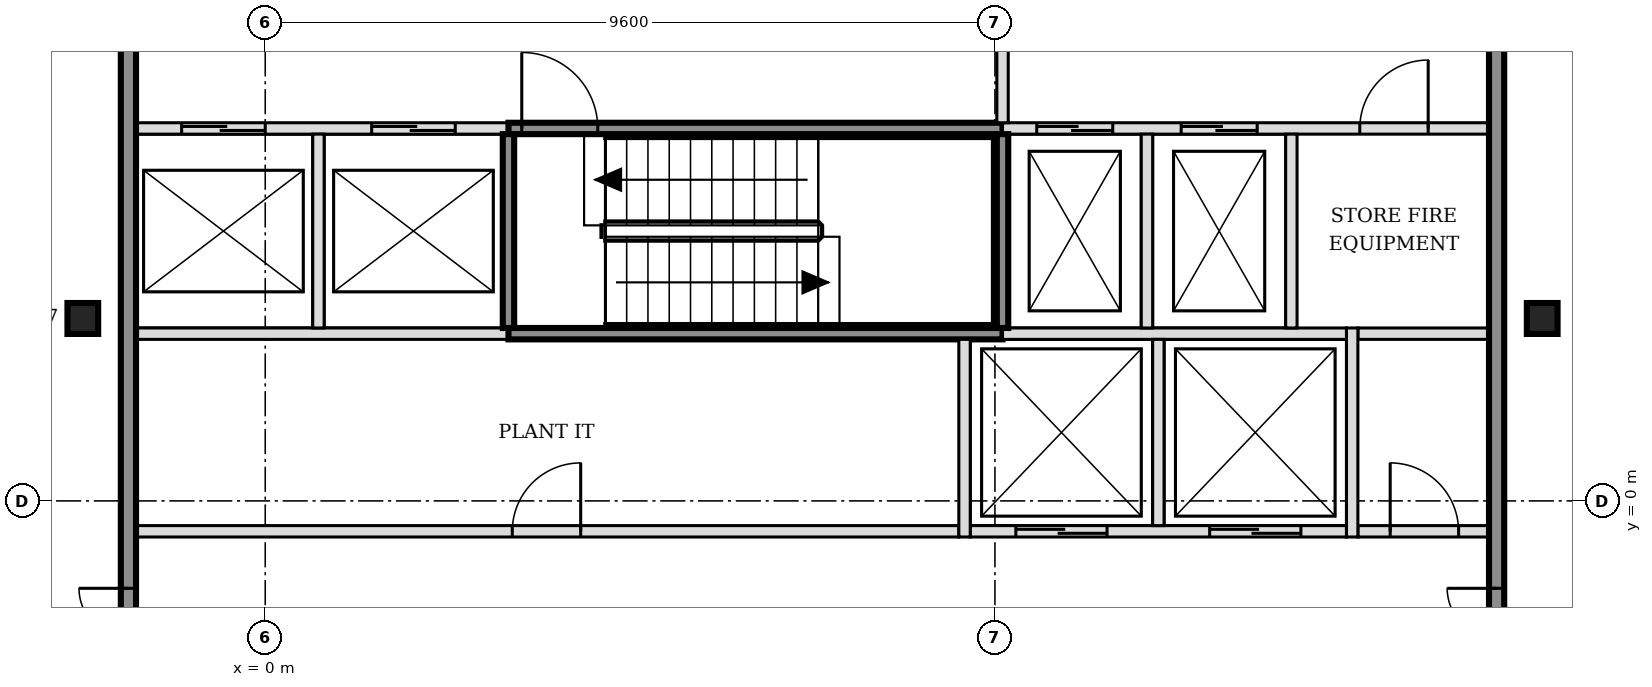
"""IFC4 building model, lengths in metres.
Left out: names, types, materials, properties, quantities, classifications, styles, units other than length and angle.
Written with IfcOpenShell. Run it as: python <this file> out.ifc"""

import sys

from ifc_helpers import new_model, si_unit, direction, frame, frame_2d, origin, origin_2d, place, context, subcontext, project, spatial, rectangle, i_section, extrude, element, fill, save


model = new_model("IFC4")
c1 = context("Model", 3, precision=1e-05, world=origin(), true_north=direction((0.0, 1.0)))
c2 = subcontext(c1, "Body", "Model", "MODEL_VIEW")
j1 = project(units=[si_unit("LENGTHUNIT", "METRE"), si_unit("PLANEANGLEUNIT", "RADIAN")], contexts=[c1])
p1 = place(None, origin())
s1 = spatial("IfcSite", under=j1, at=p1, CompositionType="ELEMENT")
p2 = place(p1, origin())
s2 = spatial("IfcBuilding", under=s1, at=p2, CompositionType="ELEMENT")
p3 = place(p2, frame((0.0, 0.0, 232.2)))
s3 = spatial("IfcBuildingStorey", under=s2, at=p3, CompositionType="ELEMENT", Elevation=232.2)
for number, where, z_axis, x_axis in (
    (1, (-2.4, 2.4, -0.15), (0.0, 0.0, 1.0), (1.0, 0.0, 0.0)),
    (2, (16.8, 2.4, -0.15), (0.0, 0.0, 1.0), (1.0, 0.0, 0.0)),
):
    element("IfcColumn", number, at=place(p3, frame(where, z_axis=z_axis, x_axis=x_axis)), inside=s3, PredefinedType="COLUMN", context=c2, shape_type="SweptSolid", body=[
        extrude(i_section(OverallWidth=0.404, OverallDepth=0.407, WebThickness=0.027, FlangeThickness=0.044, FilletRadius=0.015, at=origin_2d()), origin(), (0.0, 0.0, 1.0), 3.6),
    ])
p4 = place(p3, frame((-1.7, -0.4, 0.0), z_axis=(0.0, 0.0, 1.0), x_axis=(1.0, 0.0, 0.0)))
e3 = element("IfcWall", 3, at=p4, inside=s3, PredefinedType="PARTITIONING", context=c2, shape_type="SweptSolid", body=[
    extrude(rectangle(XDim=10.825, YDim=0.15, at=frame_2d((5.413, 0.0))), origin(), (0.0, 0.0, 1.0), 3.45),
])
p5 = place(p4, frame((4.95, 0.0, 0.0)))
e4 = element("IfcOpeningElement", 4, at=p5, cuts=e3, PredefinedType="OPENING", context=c2, shape_type="SweptSolid", body=[
    extrude(rectangle(XDim=0.9, YDim=2.1, at=frame_2d((0.45, 1.05))), frame((0.0, 0.085, 0.0), z_axis=(0.0, -1.0, 0.0), x_axis=(1.0, 0.0, 0.0)), (0.0, 0.0, 1.0), 0.17),
])
p6 = place(p3, frame((9.275, -0.4, 0.0), z_axis=(0.0, 0.0, 1.0), x_axis=(1.0, 0.0, 0.0)))
e5 = element("IfcWall", 5, at=p6, inside=s3, PredefinedType="SOLIDWALL", context=c2, shape_type="SweptSolid", body=[
    extrude(rectangle(XDim=4.95, YDim=0.15, at=frame_2d((2.475, 0.0))), origin(), (0.0, 0.0, 1.0), 3.45),
])
p7 = place(p6, frame((0.6, 0.0, 0.0)))
e6 = element("IfcOpeningElement", 6, at=p7, cuts=e5, PredefinedType="OPENING", context=c2, shape_type="SweptSolid", body=[
    extrude(rectangle(XDim=1.2, YDim=2.1, at=frame_2d((0.6, 1.05))), frame((0.0, 0.085, 0.0), z_axis=(0.0, -1.0, 0.0), x_axis=(1.0, 0.0, 0.0)), (0.0, 0.0, 1.0), 0.17),
])
p8 = place(p6, frame((3.15, 0.0, 0.0)))
e7 = element("IfcOpeningElement", 7, at=p8, cuts=e5, PredefinedType="OPENING", context=c2, shape_type="SweptSolid", body=[
    extrude(rectangle(XDim=1.2, YDim=2.1, at=frame_2d((0.6, 1.05))), frame((0.0, 0.085, 0.0), z_axis=(0.0, -1.0, 0.0), x_axis=(1.0, 0.0, 0.0)), (0.0, 0.0, 1.0), 0.17),
])
p9 = place(p3, frame((14.375, -0.4, 0.0), z_axis=(0.0, 0.0, 1.0), x_axis=(1.0, 0.0, 0.0)))
e8 = element("IfcWall", 8, at=p9, inside=s3, PredefinedType="PARTITIONING", context=c2, shape_type="SweptSolid", body=[
    extrude(rectangle(XDim=1.725, YDim=0.15, at=frame_2d((0.863, 0.0))), origin(), (0.0, 0.0, 1.0), 3.45),
])
p10 = place(p9, frame((0.425, 0.0, 0.0)))
e9 = element("IfcOpeningElement", 9, at=p10, cuts=e8, PredefinedType="OPENING", context=c2, shape_type="SweptSolid", body=[
    extrude(rectangle(XDim=0.9, YDim=2.1, at=frame_2d((0.45, 1.05))), frame((0.0, 0.085, 0.0), z_axis=(0.0, -1.0, 0.0), x_axis=(1.0, 0.0, 0.0)), (0.0, 0.0, 1.0), 0.17),
])
p11 = place(p3, frame((-1.7, 2.2, 0.0), z_axis=(0.0, 0.0, 1.0), x_axis=(1.0, 0.0, 0.0)))
e10 = element("IfcWall", 10, at=p11, inside=s3, PredefinedType="SOLIDWALL", context=c2, shape_type="SweptSolid", body=[
    extrude(rectangle(XDim=4.9, YDim=0.15, at=frame_2d((2.45, 0.0))), origin(), (0.0, 0.0, 1.0), 3.45),
])
p12 = place(p3, frame((3.2, 2.2, 0.0), z_axis=(0.0, 0.0, 1.0), x_axis=(1.0, 0.0, 0.0)))
e11 = element("IfcWall", 11, at=p12, inside=s3, PredefinedType="SOLIDWALL", context=c2, shape_type="SweptSolid", body=[
    extrude(rectangle(XDim=6.5, YDim=0.15, at=frame_2d((3.25, 0.0))), origin(), (0.0, 0.0, 1.0), 3.45),
])
p13 = place(p3, frame((9.7, 2.2, 0.0), z_axis=(0.0, 0.0, 1.0), x_axis=(1.0, 0.0, 0.0)))
e12 = element("IfcWall", 12, at=p13, inside=s3, PredefinedType="SOLIDWALL", context=c2, shape_type="SweptSolid", body=[
    extrude(rectangle(XDim=4.525, YDim=0.15, at=frame_2d((2.263, 0.0))), origin(), (0.0, 0.0, 1.0), 3.45),
])
p14 = place(p3, frame((14.375, 2.2, 0.0), z_axis=(0.0, 0.0, 1.0), x_axis=(1.0, 0.0, 0.0)))
e13 = element("IfcWall", 13, at=p14, inside=s3, PredefinedType="PARTITIONING", context=c2, shape_type="SweptSolid", body=[
    extrude(rectangle(XDim=1.725, YDim=0.15, at=frame_2d((0.863, 0.0))), origin(), (0.0, 0.0, 1.0), 3.45),
])
p15 = place(p3, frame((-1.7, 4.9, 0.0), z_axis=(0.0, 0.0, 1.0), x_axis=(1.0, 0.0, 0.0)))
e14 = element("IfcWall", 14, at=p15, inside=s3, PredefinedType="SOLIDWALL", context=c2, shape_type="SweptSolid", body=[
    extrude(rectangle(XDim=4.9, YDim=0.15, at=frame_2d((2.45, 0.0))), origin(), (0.0, 0.0, 1.0), 3.45),
])
p16 = place(p15, frame((0.6, 0.0, 0.0)))
e15 = element("IfcOpeningElement", 15, at=p16, cuts=e14, PredefinedType="OPENING", context=c2, shape_type="SweptSolid", body=[
    extrude(rectangle(XDim=1.1, YDim=2.1, at=frame_2d((0.55, 1.05))), frame((0.0, 0.085, 0.0), z_axis=(0.0, -1.0, 0.0), x_axis=(1.0, 0.0, 0.0)), (0.0, 0.0, 1.0), 0.17),
])
p17 = place(p15, frame((3.1, 0.0, 0.0)))
e16 = element("IfcOpeningElement", 16, at=p17, cuts=e14, PredefinedType="OPENING", context=c2, shape_type="SweptSolid", body=[
    extrude(rectangle(XDim=1.1, YDim=2.1, at=frame_2d((0.55, 1.05))), frame((0.0, 0.085, 0.0), z_axis=(0.0, -1.0, 0.0), x_axis=(1.0, 0.0, 0.0)), (0.0, 0.0, 1.0), 0.17),
])
p18 = place(p3, frame((3.2, 4.9, 0.0), z_axis=(0.0, 0.0, 1.0), x_axis=(1.0, 0.0, 0.0)))
e17 = element("IfcWall", 17, at=p18, inside=s3, PredefinedType="SOLIDWALL", context=c2, shape_type="SweptSolid", body=[
    extrude(rectangle(XDim=6.5, YDim=0.15, at=frame_2d((3.25, 0.0))), origin(), (0.0, 0.0, 1.0), 3.45),
])
p19 = place(p18, frame((0.175, 0.0, 0.0)))
e18 = element("IfcOpeningElement", 18, at=p19, cuts=e17, PredefinedType="OPENING", context=c2, shape_type="SweptSolid", body=[
    extrude(rectangle(XDim=1.0, YDim=2.1, at=frame_2d((0.5, 1.05))), frame((0.0, 0.085, 0.0), z_axis=(0.0, -1.0, 0.0), x_axis=(1.0, 0.0, 0.0)), (0.0, 0.0, 1.0), 0.17),
])
p20 = place(p3, frame((9.7, 4.9, 0.0), z_axis=(0.0, 0.0, 1.0), x_axis=(1.0, 0.0, 0.0)))
e19 = element("IfcWall", 19, at=p20, inside=s3, PredefinedType="SOLIDWALL", context=c2, shape_type="SweptSolid", body=[
    extrude(rectangle(XDim=6.4, YDim=0.15, at=frame_2d((3.2, 0.0))), origin(), (0.0, 0.0, 1.0), 3.45),
])
p21 = place(p20, frame((0.45, 0.0, 0.0)))
e20 = element("IfcOpeningElement", 20, at=p21, cuts=e19, PredefinedType="OPENING", context=c2, shape_type="SweptSolid", body=[
    extrude(rectangle(XDim=1.0, YDim=2.1, at=frame_2d((0.5, 1.05))), frame((0.0, 0.085, 0.0), z_axis=(0.0, -1.0, 0.0), x_axis=(1.0, 0.0, 0.0)), (0.0, 0.0, 1.0), 0.17),
])
p22 = place(p20, frame((2.35, 0.0, 0.0)))
e21 = element("IfcOpeningElement", 21, at=p22, cuts=e19, PredefinedType="OPENING", context=c2, shape_type="SweptSolid", body=[
    extrude(rectangle(XDim=1.0, YDim=2.1, at=frame_2d((0.5, 1.05))), frame((0.0, 0.085, 0.0), z_axis=(0.0, -1.0, 0.0), x_axis=(1.0, 0.0, 0.0)), (0.0, 0.0, 1.0), 0.17),
])
p23 = place(p20, frame((4.7, 0.0, 0.0)))
e22 = element("IfcOpeningElement", 22, at=p23, cuts=e19, PredefinedType="OPENING", context=c2, shape_type="SweptSolid", body=[
    extrude(rectangle(XDim=0.9, YDim=2.1, at=frame_2d((0.45, 1.05))), frame((0.0, 0.085, 0.0), z_axis=(0.0, -1.0, 0.0), x_axis=(1.0, 0.0, 0.0)), (0.0, 0.0, 1.0), 0.17),
])
p24 = place(p3, frame((-1.8, -5.5, 0.0), z_axis=(0.0, 0.0, 1.0), x_axis=(0.0, 1.0, 0.0)))
e23 = element("IfcWall", 23, at=p24, inside=s3, PredefinedType="SOLIDWALL", context=c2, shape_type="SweptSolid", body=[
    extrude(rectangle(XDim=15.8, YDim=0.2, at=frame_2d((7.9, 0.0))), origin(), (0.0, 0.0, 1.0), 3.45),
])
p25 = place(p24, frame((3.05, 0.0, 0.0)))
e24 = element("IfcOpeningElement", 24, at=p25, cuts=e23, PredefinedType="OPENING", context=c2, shape_type="SweptSolid", body=[
    extrude(rectangle(XDim=1.3, YDim=2.1, at=frame_2d((0.65, 1.05))), frame((0.0, 0.11, 0.0), z_axis=(0.0, -1.0, 0.0), x_axis=(1.0, 0.0, 0.0)), (0.0, 0.0, 1.0), 0.22),
])
p26 = place(p24, frame((11.45, 0.0, 0.0)))
e25 = element("IfcOpeningElement", 25, at=p26, cuts=e23, PredefinedType="OPENING", context=c2, shape_type="SweptSolid", body=[
    extrude(rectangle(XDim=1.3, YDim=2.1, at=frame_2d((0.65, 1.05))), frame((0.0, 0.11, 0.0), z_axis=(0.0, -1.0, 0.0), x_axis=(1.0, 0.0, 0.0)), (0.0, 0.0, 1.0), 0.22),
])
for number, where, z_axis, x_axis in (
    (26, (0.7, 2.275, 0.0), (0.0, 0.0, 1.0), (0.0, 1.0, 0.0)),
    (27, (3.2, 2.275, 0.0), (0.0, 0.0, 1.0), (0.0, 1.0, 0.0)),
):
    element("IfcWall", number, at=place(p3, frame(where, z_axis=z_axis, x_axis=x_axis)), inside=s3, PredefinedType="SOLIDWALL", context=c2, shape_type="SweptSolid", body=[
        extrude(rectangle(XDim=2.55, YDim=0.15, at=frame_2d((1.275, 0.0))), origin(), (0.0, 0.0, 1.0), 3.45),
    ])
p27 = place(p3, frame((9.2, -0.475, 0.0), z_axis=(0.0, 0.0, 1.0), x_axis=(0.0, 1.0, 0.0)))
e28 = element("IfcWall", 28, at=p27, inside=s3, PredefinedType="SOLIDWALL", context=c2, shape_type="SweptSolid", body=[
    extrude(rectangle(XDim=2.6, YDim=0.15, at=frame_2d((1.3, 0.0))), origin(), (0.0, 0.0, 1.0), 3.45),
])
p28 = place(p3, frame((9.7, 2.275, 0.0), z_axis=(0.0, 0.0, 1.0), x_axis=(0.0, 1.0, 0.0)))
e29 = element("IfcWall", 29, at=p28, inside=s3, PredefinedType="SOLIDWALL", context=c2, shape_type="SweptSolid", body=[
    extrude(rectangle(XDim=2.55, YDim=0.15, at=frame_2d((1.275, 0.0))), origin(), (0.0, 0.0, 1.0), 3.45),
])
p29 = place(p3, frame((9.7, 4.975, 0.0), z_axis=(0.0, 0.0, 1.0), x_axis=(0.0, 1.0, 0.0)))
e30 = element("IfcWall", 30, at=p29, inside=s3, PredefinedType="SOLIDWALL", context=c2, shape_type="SweptSolid", body=[
    extrude(rectangle(XDim=2.45, YDim=0.15, at=frame_2d((1.225, 0.0))), origin(), (0.0, 0.0, 1.0), 3.45),
])
p30 = place(p3, frame((11.6, 2.275, 0.0), z_axis=(0.0, 0.0, 1.0), x_axis=(0.0, 1.0, 0.0)))
e31 = element("IfcWall", 31, at=p30, inside=s3, PredefinedType="SOLIDWALL", context=c2, shape_type="SweptSolid", body=[
    extrude(rectangle(XDim=2.55, YDim=0.15, at=frame_2d((1.275, 0.0))), origin(), (0.0, 0.0, 1.0), 3.45),
])
p31 = place(p3, frame((11.75, -0.325, 0.0), z_axis=(0.0, 0.0, 1.0), x_axis=(0.0, 1.0, 0.0)))
e32 = element("IfcWall", 32, at=p31, inside=s3, PredefinedType="SOLIDWALL", context=c2, shape_type="SweptSolid", body=[
    extrude(rectangle(XDim=2.45, YDim=0.15, at=frame_2d((1.225, 0.0))), origin(), (0.0, 0.0, 1.0), 3.45),
])
p32 = place(p3, frame((13.5, 2.275, 0.0), z_axis=(0.0, 0.0, 1.0), x_axis=(0.0, 1.0, 0.0)))
e33 = element("IfcWall", 33, at=p32, inside=s3, PredefinedType="SOLIDWALL", context=c2, shape_type="SweptSolid", body=[
    extrude(rectangle(XDim=2.55, YDim=0.15, at=frame_2d((1.275, 0.0))), origin(), (0.0, 0.0, 1.0), 3.45),
])
p33 = place(p3, frame((14.3, -0.475, 0.0), z_axis=(0.0, 0.0, 1.0), x_axis=(0.0, 1.0, 0.0)))
e34 = element("IfcWall", 34, at=p33, inside=s3, PredefinedType="SOLIDWALL", context=c2, shape_type="SweptSolid", body=[
    extrude(rectangle(XDim=2.75, YDim=0.15, at=frame_2d((1.375, 0.0))), origin(), (0.0, 0.0, 1.0), 3.45),
])
p34 = place(p3, frame((16.2, -5.5, 0.0), z_axis=(0.0, 0.0, 1.0), x_axis=(0.0, 1.0, 0.0)))
e35 = element("IfcWall", 35, at=p34, inside=s3, PredefinedType="SOLIDWALL", context=c2, shape_type="SweptSolid", body=[
    extrude(rectangle(XDim=15.8, YDim=0.2, at=frame_2d((7.9, 0.0))), origin(), (0.0, 0.0, 1.0), 3.45),
])
p35 = place(p34, frame((3.05, 0.0, 0.0)))
e36 = element("IfcOpeningElement", 36, at=p35, cuts=e35, PredefinedType="OPENING", context=c2, shape_type="SweptSolid", body=[
    extrude(rectangle(XDim=1.3, YDim=2.1, at=frame_2d((0.65, 1.05))), frame((0.0, 0.11, 0.0), z_axis=(0.0, -1.0, 0.0), x_axis=(1.0, 0.0, 0.0)), (0.0, 0.0, 1.0), 0.22),
])
p36 = place(p34, frame((11.45, 0.0, 0.0)))
e37 = element("IfcOpeningElement", 37, at=p36, cuts=e35, PredefinedType="OPENING", context=c2, shape_type="SweptSolid", body=[
    extrude(rectangle(XDim=1.3, YDim=2.1, at=frame_2d((0.65, 1.05))), frame((0.0, 0.11, 0.0), z_axis=(0.0, -1.0, 0.0), x_axis=(1.0, 0.0, 0.0)), (0.0, 0.0, 1.0), 0.22),
])
p37 = place(p7, origin())
e38 = element("IfcDoor", 38, at=p37, inside=s3, OperationType="DOUBLE_DOOR_SLIDING", PredefinedType="DOOR", context=c2, shape_type="SweptSolid", body=[
    extrude(rectangle(XDim=1.2, YDim=2.1, at=frame_2d((0.6, 1.05))), frame((0.0, 0.025, 0.0), z_axis=(0.0, -1.0, 0.0), x_axis=(1.0, 0.0, 0.0)), (0.0, 0.0, 1.0), 0.05),
])
fill(e6, e38)
p38 = place(p8, origin())
e39 = element("IfcDoor", 39, at=p38, inside=s3, OperationType="DOUBLE_DOOR_SLIDING", PredefinedType="DOOR", context=c2, shape_type="SweptSolid", body=[
    extrude(rectangle(XDim=1.2, YDim=2.1, at=frame_2d((0.6, 1.05))), frame((0.0, 0.025, 0.0), z_axis=(0.0, -1.0, 0.0), x_axis=(1.0, 0.0, 0.0)), (0.0, 0.0, 1.0), 0.05),
])
fill(e7, e39)
p39 = place(p16, origin())
e40 = element("IfcDoor", 40, at=p39, inside=s3, OperationType="DOUBLE_DOOR_SLIDING", PredefinedType="DOOR", context=c2, shape_type="SweptSolid", body=[
    extrude(rectangle(XDim=1.1, YDim=2.1, at=frame_2d((0.55, 1.05))), frame((0.0, 0.025, 0.0), z_axis=(0.0, -1.0, 0.0), x_axis=(1.0, 0.0, 0.0)), (0.0, 0.0, 1.0), 0.05),
])
fill(e15, e40)
p40 = place(p17, origin())
e41 = element("IfcDoor", 41, at=p40, inside=s3, OperationType="DOUBLE_DOOR_SLIDING", PredefinedType="DOOR", context=c2, shape_type="SweptSolid", body=[
    extrude(rectangle(XDim=1.1, YDim=2.1, at=frame_2d((0.55, 1.05))), frame((0.0, 0.025, 0.0), z_axis=(0.0, -1.0, 0.0), x_axis=(1.0, 0.0, 0.0)), (0.0, 0.0, 1.0), 0.05),
])
fill(e16, e41)
p41 = place(p21, origin())
e42 = element("IfcDoor", 42, at=p41, inside=s3, OperationType="DOUBLE_DOOR_SLIDING", PredefinedType="DOOR", context=c2, shape_type="SweptSolid", body=[
    extrude(rectangle(XDim=1.0, YDim=2.1, at=frame_2d((0.5, 1.05))), frame((0.0, 0.025, 0.0), z_axis=(0.0, -1.0, 0.0), x_axis=(1.0, 0.0, 0.0)), (0.0, 0.0, 1.0), 0.05),
])
fill(e20, e42)
p42 = place(p22, origin())
e43 = element("IfcDoor", 43, at=p42, inside=s3, OperationType="DOUBLE_DOOR_SLIDING", PredefinedType="DOOR", context=c2, shape_type="SweptSolid", body=[
    extrude(rectangle(XDim=1.0, YDim=2.1, at=frame_2d((0.5, 1.05))), frame((0.0, 0.025, 0.0), z_axis=(0.0, -1.0, 0.0), x_axis=(1.0, 0.0, 0.0)), (0.0, 0.0, 1.0), 0.05),
])
fill(e21, e43)
p43 = place(p19, origin())
e44 = element("IfcDoor", 44, at=p43, inside=s3, OperationType="SINGLE_SWING_LEFT", PredefinedType="DOOR", context=c2, shape_type="SweptSolid", body=[
    extrude(rectangle(XDim=1.0, YDim=2.1, at=frame_2d((0.5, 1.05))), frame((0.0, 0.025, 0.0), z_axis=(0.0, -1.0, 0.0), x_axis=(1.0, 0.0, 0.0)), (0.0, 0.0, 1.0), 0.05),
])
fill(e18, e44)
p44 = place(p25, origin())
e45 = element("IfcDoor", 45, at=p44, inside=s3, OperationType="DOUBLE_DOOR_SINGLE_SWING", PredefinedType="DOOR", context=c2, shape_type="SweptSolid", body=[
    extrude(rectangle(XDim=1.3, YDim=2.1, at=frame_2d((0.65, 1.05))), frame((0.0, 0.025, 0.0), z_axis=(0.0, -1.0, 0.0), x_axis=(1.0, 0.0, 0.0)), (0.0, 0.0, 1.0), 0.05),
])
fill(e24, e45)
p45 = place(p35, origin())
e46 = element("IfcDoor", 46, at=p45, inside=s3, OperationType="DOUBLE_DOOR_SINGLE_SWING", PredefinedType="DOOR", context=c2, shape_type="SweptSolid", body=[
    extrude(rectangle(XDim=1.3, YDim=2.1, at=frame_2d((0.65, 1.05))), frame((0.0, 0.025, 0.0), z_axis=(0.0, -1.0, 0.0), x_axis=(1.0, 0.0, 0.0)), (0.0, 0.0, 1.0), 0.05),
])
fill(e36, e46)
p46 = place(p10, origin())
e47 = element("IfcDoor", 47, at=p46, inside=s3, OperationType="SINGLE_SWING_LEFT", PredefinedType="DOOR", context=c2, shape_type="SweptSolid", body=[
    extrude(rectangle(XDim=0.9, YDim=2.1, at=frame_2d((0.45, 1.05))), frame((0.0, 0.025, 0.0), z_axis=(0.0, -1.0, 0.0), x_axis=(1.0, 0.0, 0.0)), (0.0, 0.0, 1.0), 0.05),
])
fill(e9, e47)
p47 = place(p23, origin())
e48 = element("IfcDoor", 48, at=p47, inside=s3, OperationType="SINGLE_SWING_RIGHT", PredefinedType="DOOR", context=c2, shape_type="SweptSolid", body=[
    extrude(rectangle(XDim=0.9, YDim=2.1, at=frame_2d((0.45, 1.05))), frame((0.0, 0.025, 0.0), z_axis=(0.0, -1.0, 0.0), x_axis=(1.0, 0.0, 0.0)), (0.0, 0.0, 1.0), 0.05),
])
fill(e22, e48)
p48 = place(p5, origin())
e49 = element("IfcDoor", 49, at=p48, inside=s3, OperationType="SINGLE_SWING_RIGHT", PredefinedType="DOOR", context=c2, shape_type="SweptSolid", body=[
    extrude(rectangle(XDim=0.9, YDim=2.1, at=frame_2d((0.45, 1.05))), frame((0.0, 0.025, 0.0), z_axis=(0.0, -1.0, 0.0), x_axis=(1.0, 0.0, 0.0)), (0.0, 0.0, 1.0), 0.05),
])
fill(e4, e49)
save(model, sys.argv[1])
